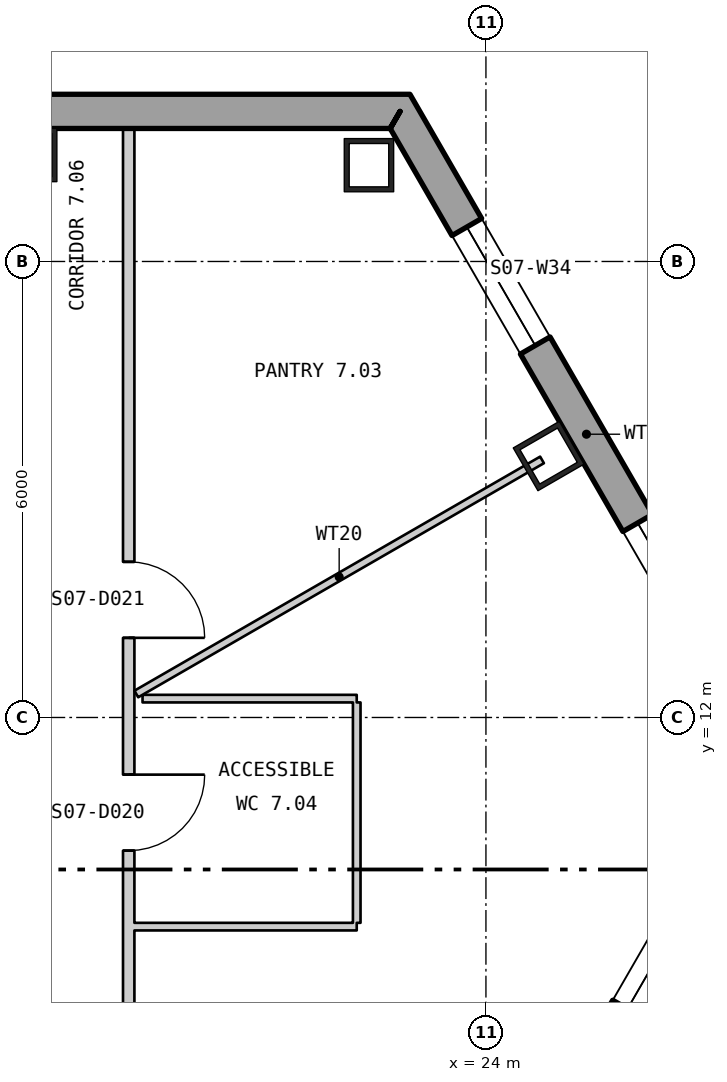
"""IFC4 building model, lengths in metres.
Left out: names, types, materials, properties, quantities, classifications, styles, units other than length and angle.
Written with IfcOpenShell. Run it as: python <this file> out.ifc"""

import sys

from ifc_helpers import new_model, si_unit, direction, frame, frame_2d, origin, origin_2d, place, context, subcontext, project, spatial, polyline, rectangle, hollow_rectangle, outline, extrude, element, fill, save


model = new_model("IFC4")
c1 = context("Model", 3, precision=1e-05, world=origin(), true_north=direction((0.0, 1.0)))
c2 = subcontext(c1, "Body", "Model", "MODEL_VIEW")
j1 = project(units=[si_unit("LENGTHUNIT", "METRE"), si_unit("PLANEANGLEUNIT", "RADIAN")], contexts=[c1])
p1 = place(None, origin())
s1 = spatial("IfcSite", under=j1, at=p1, CompositionType="ELEMENT")
p2 = place(p1, origin())
s2 = spatial("IfcBuilding", under=s1, at=p2, CompositionType="ELEMENT")
p3 = place(p2, frame((0.0, 0.0, 97.8)))
s3 = spatial("IfcBuildingStorey", under=s2, at=p3, CompositionType="ELEMENT", Elevation=97.8)
for number, where, z_axis, x_axis in (
    (1, (22.461, 19.267, 0.0), (0.0, 0.0, 1.0), (-1.0, 0.0, 0.0)),
    (2, (18.03, 19.4, 0.0), (0.0, 0.0, 1.0), (-1.0, 0.0, 0.0)),
    (3, (24.825, 15.44, 0.0), (0.0, 0.0, 1.0), (-0.5, 0.866, 0.0)),
):
    element("IfcColumn", number, at=place(p3, frame(where, z_axis=z_axis, x_axis=x_axis)), inside=s3, PredefinedType="COLUMN", context=c2, shape_type="SweptSolid", body=[
        extrude(hollow_rectangle(XDim=0.65, YDim=0.7, WallThickness=0.065, at=origin_2d()), origin(), (0.0, 0.0, 1.0), 4.5),
    ])
p4 = place(p3, frame((22.87, 19.975, -0.4), z_axis=(0.0, 0.0, 1.0), x_axis=(-1.0, 0.0, 0.0)))
e4 = element("IfcWall", 4, at=p4, inside=s3, PredefinedType="SOLIDWALL", context=c2, shape_type="SweptSolid", body=[
    extrude(outline(polyline([(-0.13, -0.225), (45.87, -0.225), (45.61, 0.225), (0.13, 0.225), (-0.13, -0.225)])), origin(), (0.0, 0.0, 1.0), 4.5),
])
p5 = place(p4, frame((5.893, 0.0, 1.3)))
e5 = element("IfcOpeningElement", 5, at=p5, cuts=e4, PredefinedType="OPENING", context=c2, shape_type="SweptSolid", body=[
    extrude(rectangle(XDim=2.4, YDim=2.6, at=frame_2d((1.2, 1.3))), frame((0.0, 0.235, 0.0), z_axis=(0.0, -1.0, 0.0), x_axis=(1.0, 0.0, 0.0)), (0.0, 0.0, 1.0), 0.47),
])
p6 = place(p4, frame((10.401, 0.0, 1.3)))
e6 = element("IfcOpeningElement", 6, at=p6, cuts=e4, PredefinedType="OPENING", context=c2, shape_type="SweptSolid", body=[
    extrude(rectangle(XDim=2.4, YDim=2.6, at=frame_2d((1.2, 1.3))), frame((0.0, 0.235, 0.0), z_axis=(0.0, -1.0, 0.0), x_axis=(1.0, 0.0, 0.0)), (0.0, 0.0, 1.0), 0.47),
])
p7 = place(p4, frame((14.909, 0.0, 1.3)))
e7 = element("IfcOpeningElement", 7, at=p7, cuts=e4, PredefinedType="OPENING", context=c2, shape_type="SweptSolid", body=[
    extrude(rectangle(XDim=2.4, YDim=2.6, at=frame_2d((1.2, 1.3))), frame((0.0, 0.235, 0.0), z_axis=(0.0, -1.0, 0.0), x_axis=(1.0, 0.0, 0.0)), (0.0, 0.0, 1.0), 0.47),
])
p8 = place(p4, frame((19.416, 0.0, 1.3)))
e8 = element("IfcOpeningElement", 8, at=p8, cuts=e4, PredefinedType="OPENING", context=c2, shape_type="SweptSolid", body=[
    extrude(rectangle(XDim=2.4, YDim=2.6, at=frame_2d((1.2, 1.3))), frame((0.0, 0.235, 0.0), z_axis=(0.0, -1.0, 0.0), x_axis=(1.0, 0.0, 0.0)), (0.0, 0.0, 1.0), 0.47),
])
p9 = place(p4, frame((23.924, 0.0, 1.3)))
e9 = element("IfcOpeningElement", 9, at=p9, cuts=e4, PredefinedType="OPENING", context=c2, shape_type="SweptSolid", body=[
    extrude(rectangle(XDim=2.4, YDim=2.6, at=frame_2d((1.2, 1.3))), frame((0.0, 0.235, 0.0), z_axis=(0.0, -1.0, 0.0), x_axis=(1.0, 0.0, 0.0)), (0.0, 0.0, 1.0), 0.47),
])
p10 = place(p4, frame((28.431, 0.0, 1.3)))
e10 = element("IfcOpeningElement", 10, at=p10, cuts=e4, PredefinedType="OPENING", context=c2, shape_type="SweptSolid", body=[
    extrude(rectangle(XDim=2.4, YDim=2.6, at=frame_2d((1.2, 1.3))), frame((0.0, 0.235, 0.0), z_axis=(0.0, -1.0, 0.0), x_axis=(1.0, 0.0, 0.0)), (0.0, 0.0, 1.0), 0.47),
])
p11 = place(p4, frame((32.939, 0.0, 1.3)))
e11 = element("IfcOpeningElement", 11, at=p11, cuts=e4, PredefinedType="OPENING", context=c2, shape_type="SweptSolid", body=[
    extrude(rectangle(XDim=2.4, YDim=2.6, at=frame_2d((1.2, 1.3))), frame((0.0, 0.235, 0.0), z_axis=(0.0, -1.0, 0.0), x_axis=(1.0, 0.0, 0.0)), (0.0, 0.0, 1.0), 0.47),
])
p12 = place(p4, frame((37.447, 0.0, 1.3)))
e12 = element("IfcOpeningElement", 12, at=p12, cuts=e4, PredefinedType="OPENING", context=c2, shape_type="SweptSolid", body=[
    extrude(rectangle(XDim=2.4, YDim=2.6, at=frame_2d((1.2, 1.3))), frame((0.0, 0.235, 0.0), z_axis=(0.0, -1.0, 0.0), x_axis=(1.0, 0.0, 0.0)), (0.0, 0.0, 1.0), 0.47),
])
p13 = place(p4, frame((41.916, 0.0, 1.3)))
e13 = element("IfcOpeningElement", 13, at=p13, cuts=e4, PredefinedType="OPENING", context=c2, shape_type="SweptSolid", body=[
    extrude(rectangle(XDim=2.4, YDim=2.6, at=frame_2d((1.2, 1.3))), frame((0.0, 0.235, 0.0), z_axis=(0.0, -1.0, 0.0), x_axis=(1.0, 0.0, 0.0)), (0.0, 0.0, 1.0), 0.47),
])
p14 = place(p3, frame((4.905, -28.133, -0.18), z_axis=(0.0, 0.0, 1.0), x_axis=(0.500000711659, 0.866024992908, 0.0)))
e14 = element("IfcWall", 14, at=p14, inside=s3, PredefinedType="SOLIDWALL", context=c2, shape_type="SweptSolid", body=[
    extrude(outline(polyline([(-0.13, -0.225), (45.87, -0.225), (45.61, 0.225), (0.13, 0.225), (-0.13, -0.225)])), origin(), (0.0, 0.0, 1.0), 4.28),
])
p15 = place(p14, frame((1.424, 0.0, 1.08)))
e15 = element("IfcOpeningElement", 15, at=p15, cuts=e14, PredefinedType="OPENING", context=c2, shape_type="SweptSolid", body=[
    extrude(rectangle(XDim=2.4, YDim=2.6, at=frame_2d((1.2, 1.3))), frame((0.0, 0.235, 0.0), z_axis=(0.0, -1.0, 0.0), x_axis=(1.0, 0.0, 0.0)), (0.0, 0.0, 1.0), 0.47),
])
p16 = place(p14, frame((5.893, 0.0, 1.08)))
e16 = element("IfcOpeningElement", 16, at=p16, cuts=e14, PredefinedType="OPENING", context=c2, shape_type="SweptSolid", body=[
    extrude(rectangle(XDim=2.4, YDim=2.6, at=frame_2d((1.2, 1.3))), frame((0.0, 0.235, 0.0), z_axis=(0.0, -1.0, 0.0), x_axis=(1.0, 0.0, 0.0)), (0.0, 0.0, 1.0), 0.47),
])
p17 = place(p14, frame((10.401, 0.0, 1.08)))
e17 = element("IfcOpeningElement", 17, at=p17, cuts=e14, PredefinedType="OPENING", context=c2, shape_type="SweptSolid", body=[
    extrude(rectangle(XDim=2.4, YDim=2.6, at=frame_2d((1.2, 1.3))), frame((0.0, 0.235, 0.0), z_axis=(0.0, -1.0, 0.0), x_axis=(1.0, 0.0, 0.0)), (0.0, 0.0, 1.0), 0.47),
])
p18 = place(p14, frame((14.909, 0.0, 1.08)))
e18 = element("IfcOpeningElement", 18, at=p18, cuts=e14, PredefinedType="OPENING", context=c2, shape_type="SweptSolid", body=[
    extrude(rectangle(XDim=2.4, YDim=2.6, at=frame_2d((1.2, 1.3))), frame((0.0, 0.235, 0.0), z_axis=(0.0, -1.0, 0.0), x_axis=(1.0, 0.0, 0.0)), (0.0, 0.0, 1.0), 0.47),
])
p19 = place(p14, frame((19.416, 0.0, 1.08)))
e19 = element("IfcOpeningElement", 19, at=p19, cuts=e14, PredefinedType="OPENING", context=c2, shape_type="SweptSolid", body=[
    extrude(rectangle(XDim=2.4, YDim=2.6, at=frame_2d((1.2, 1.3))), frame((0.0, 0.235, 0.0), z_axis=(0.0, -1.0, 0.0), x_axis=(1.0, 0.0, 0.0)), (0.0, 0.0, 1.0), 0.47),
])
p20 = place(p14, frame((28.431, 0.0, 1.08)))
e20 = element("IfcOpeningElement", 20, at=p20, cuts=e14, PredefinedType="OPENING", context=c2, shape_type="SweptSolid", body=[
    extrude(rectangle(XDim=2.4, YDim=2.6, at=frame_2d((1.2, 1.3))), frame((0.0, 0.235, 0.0), z_axis=(0.0, -1.0, 0.0), x_axis=(1.0, 0.0, 0.0)), (0.0, 0.0, 1.0), 0.47),
])
p21 = place(p14, frame((32.939, 0.0, 1.08)))
e21 = element("IfcOpeningElement", 21, at=p21, cuts=e14, PredefinedType="OPENING", context=c2, shape_type="SweptSolid", body=[
    extrude(rectangle(XDim=2.4, YDim=2.6, at=frame_2d((1.2, 1.3))), frame((0.0, 0.235, 0.0), z_axis=(0.0, -1.0, 0.0), x_axis=(1.0, 0.0, 0.0)), (0.0, 0.0, 1.0), 0.47),
])
p22 = place(p14, frame((37.447, 0.0, 1.08)))
e22 = element("IfcOpeningElement", 22, at=p22, cuts=e14, PredefinedType="OPENING", context=c2, shape_type="SweptSolid", body=[
    extrude(rectangle(XDim=2.4, YDim=2.6, at=frame_2d((1.2, 1.3))), frame((0.0, 0.235, 0.0), z_axis=(0.0, -1.0, 0.0), x_axis=(1.0, 0.0, 0.0)), (0.0, 0.0, 1.0), 0.47),
])
p23 = place(p14, frame((41.916, 0.0, 1.08)))
e23 = element("IfcOpeningElement", 23, at=p23, cuts=e14, PredefinedType="OPENING", context=c2, shape_type="SweptSolid", body=[
    extrude(rectangle(XDim=2.4, YDim=2.6, at=frame_2d((1.2, 1.3))), frame((0.0, 0.235, 0.0), z_axis=(0.0, -1.0, 0.0), x_axis=(1.0, 0.0, 0.0)), (0.0, 0.0, 1.0), 0.47),
])
p24 = place(p3, frame((27.775, 11.479, -0.4), z_axis=(0.0, 0.0, 1.0), x_axis=(-0.499999223869, 0.866025851883, 0.0)))
e24 = element("IfcWall", 24, at=p24, inside=s3, PredefinedType="SOLIDWALL", context=c2, shape_type="SweptSolid", body=[
    extrude(outline(polyline([(-0.13, -0.225), (9.94, -0.225), (9.68, 0.225), (0.13, 0.225), (-0.13, -0.225)])), origin(), (0.0, 0.0, 1.0), 4.5),
])
p25 = place(p24, frame((1.757, 0.0, 1.3)))
e25 = element("IfcOpeningElement", 25, at=p25, cuts=e24, PredefinedType="OPENING", context=c2, shape_type="SweptSolid", body=[
    extrude(rectangle(XDim=1.8, YDim=2.6, at=frame_2d((0.9, 1.3))), frame((0.0, 0.235, 0.0), z_axis=(0.0, -1.0, 0.0), x_axis=(1.0, 0.0, 0.0)), (0.0, 0.0, 1.0), 0.47),
])
p26 = place(p24, frame((6.253, 0.0, 1.3)))
e26 = element("IfcOpeningElement", 26, at=p26, cuts=e24, PredefinedType="OPENING", context=c2, shape_type="SweptSolid", body=[
    extrude(rectangle(XDim=1.8, YDim=2.6, at=frame_2d((0.9, 1.3))), frame((0.0, 0.235, 0.0), z_axis=(0.0, -1.0, 0.0), x_axis=(1.0, 0.0, 0.0)), (0.0, 0.0, 1.0), 0.47),
])
p27 = place(p3, frame((19.3, -1.875, 0.0), z_axis=(0.0, 0.0, 1.0), x_axis=(0.0, 1.0, 0.0)))
e27 = element("IfcWall", 27, at=p27, inside=s3, PredefinedType="PARTITIONING", context=c2, shape_type="SweptSolid", body=[
    extrude(rectangle(XDim=14.173, YDim=0.15, at=frame_2d((7.087, 0.0))), origin(), (0.0, 0.0, 1.0), 4.3),
])
p28 = place(p27, frame((6.011, 0.0, 0.0)))
e28 = element("IfcOpeningElement", 28, at=p28, cuts=e27, PredefinedType="OPENING", context=c2, shape_type="SweptSolid", body=[
    extrude(rectangle(XDim=1.0, YDim=2.1, at=frame_2d((0.5, 1.05))), frame((0.0, 0.085, 0.0), z_axis=(0.0, -1.0, 0.0), x_axis=(1.0, 0.0, 0.0)), (0.0, 0.0, 1.0), 0.17),
])
p29 = place(p27, frame((12.123, 0.0, 0.0)))
e29 = element("IfcOpeningElement", 29, at=p29, cuts=e27, PredefinedType="OPENING", context=c2, shape_type="SweptSolid", body=[
    extrude(rectangle(XDim=1.0, YDim=2.1, at=frame_2d((0.5, 1.05))), frame((0.0, 0.085, 0.0), z_axis=(0.0, -1.0, 0.0), x_axis=(1.0, 0.0, 0.0)), (0.0, 0.0, 1.0), 0.17),
])
p30 = place(p3, frame((19.3, 12.298, 0.0), z_axis=(0.0, 0.0, 1.0), x_axis=(0.0, 1.0, 0.0)))
e30 = element("IfcWall", 30, at=p30, inside=s3, PredefinedType="PARTITIONING", context=c2, shape_type="SweptSolid", body=[
    extrude(rectangle(XDim=7.451, YDim=0.15, at=frame_2d((3.725, 0.0))), origin(), (0.0, 0.0, 1.0), 4.3),
])
p31 = place(p30, frame((0.75, 0.0, 0.0)))
e31 = element("IfcOpeningElement", 31, at=p31, cuts=e30, PredefinedType="OPENING", context=c2, shape_type="SweptSolid", body=[
    extrude(rectangle(XDim=1.0, YDim=2.1, at=frame_2d((0.5, 1.05))), frame((0.0, 0.085, 0.0), z_axis=(0.0, -1.0, 0.0), x_axis=(1.0, 0.0, 0.0)), (0.0, 0.0, 1.0), 0.17),
])
p32 = place(p3, frame((19.375, 9.248, 0.0), z_axis=(0.0, 0.0, 1.0), x_axis=(1.0, 0.0, 0.0)))
e32 = element("IfcWall", 32, at=p32, inside=s3, PredefinedType="PARTITIONING", context=c2, shape_type="SweptSolid", body=[
    extrude(rectangle(XDim=2.925, YDim=0.1, at=frame_2d((1.462, 0.0))), origin(), (0.0, 0.0, 1.0), 4.3),
])
p33 = place(p3, frame((19.4, 12.309, 0.0), z_axis=(0.0, 0.0, 1.0), x_axis=(0.866158571006, 0.499769276639, 0.0)))
e33 = element("IfcWall", 33, at=p33, inside=s3, PredefinedType="PARTITIONING", context=c2, shape_type="SweptSolid", body=[
    extrude(rectangle(XDim=6.163, YDim=0.1, at=frame_2d((3.081, 0.0))), origin(), (0.0, 0.0, 1.0), 4.3),
])
p34 = place(p3, frame((19.482, 12.248, 0.0), z_axis=(0.0, 0.0, 1.0), x_axis=(1.0, 0.0, 0.0)))
e34 = element("IfcWall", 34, at=p34, inside=s3, PredefinedType="PARTITIONING", context=c2, shape_type="SweptSolid", body=[
    extrude(rectangle(XDim=2.818, YDim=0.1, at=frame_2d((1.409, 0.0))), origin(), (0.0, 0.0, 1.0), 4.3),
])
p35 = place(p3, frame((22.3, 9.298, 0.0), z_axis=(0.0, 0.0, 1.0), x_axis=(0.0, 1.0, 0.0)))
e35 = element("IfcWall", 35, at=p35, inside=s3, PredefinedType="PARTITIONING", context=c2, shape_type="SweptSolid", body=[
    extrude(rectangle(XDim=2.9, YDim=0.1, at=frame_2d((1.45, 0.0))), origin(), (0.0, 0.0, 1.0), 4.3),
])
p36 = place(p23, origin())
e36 = element("IfcWindow", 36, at=p36, inside=s3, PartitioningType="SINGLE_PANEL", PredefinedType="WINDOW", context=c2, shape_type="SweptSolid", body=[
    extrude(rectangle(XDim=2.4, YDim=2.6, at=frame_2d((1.2, 1.3))), frame((0.0, 0.105, 0.0), z_axis=(0.0, -1.0, 0.0), x_axis=(1.0, 0.0, 0.0)), (0.0, 0.0, 1.0), 0.06),
])
fill(e23, e36)
p37 = place(p25, origin())
e37 = element("IfcWindow", 37, at=p37, inside=s3, PartitioningType="SINGLE_PANEL", PredefinedType="WINDOW", context=c2, shape_type="SweptSolid", body=[
    extrude(rectangle(XDim=1.8, YDim=2.6, at=frame_2d((0.9, 1.3))), frame((0.0, 0.105, 0.0), z_axis=(0.0, -1.0, 0.0), x_axis=(1.0, 0.0, 0.0)), (0.0, 0.0, 1.0), 0.06),
])
fill(e25, e37)
p38 = place(p26, origin())
e38 = element("IfcWindow", 38, at=p38, inside=s3, PartitioningType="SINGLE_PANEL", PredefinedType="WINDOW", context=c2, shape_type="SweptSolid", body=[
    extrude(rectangle(XDim=1.8, YDim=2.6, at=frame_2d((0.9, 1.3))), frame((0.0, 0.105, 0.0), z_axis=(0.0, -1.0, 0.0), x_axis=(1.0, 0.0, 0.0)), (0.0, 0.0, 1.0), 0.06),
])
fill(e26, e38)
p39 = place(p29, origin())
e39 = element("IfcDoor", 39, at=p39, inside=s3, OperationType="SINGLE_SWING_RIGHT", PredefinedType="DOOR", context=c2, shape_type="SweptSolid", body=[
    extrude(rectangle(XDim=1.0, YDim=2.1, at=frame_2d((0.5, 1.05))), frame((0.0, 0.025, 0.0), z_axis=(0.0, -1.0, 0.0), x_axis=(1.0, 0.0, 0.0)), (0.0, 0.0, 1.0), 0.05),
])
fill(e29, e39)
p40 = place(p31, origin())
e40 = element("IfcDoor", 40, at=p40, inside=s3, OperationType="SINGLE_SWING_LEFT", PredefinedType="DOOR", context=c2, shape_type="SweptSolid", body=[
    extrude(rectangle(XDim=1.0, YDim=2.1, at=frame_2d((0.5, 1.05))), frame((0.0, 0.025, 0.0), z_axis=(0.0, -1.0, 0.0), x_axis=(1.0, 0.0, 0.0)), (0.0, 0.0, 1.0), 0.05),
])
fill(e31, e40)
save(model, sys.argv[1])
